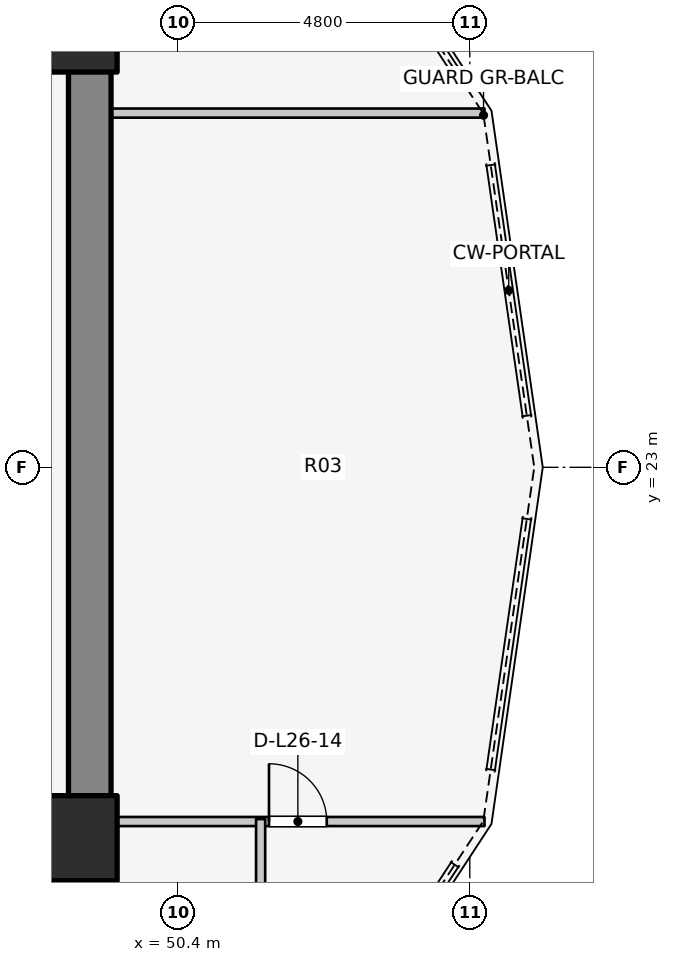
"""IFC4 building model, lengths in metres.
Left out: names, types, materials, properties, quantities, classifications, styles, units other than length and angle.
Written with IfcOpenShell. Run it as: python <this file> out.ifc"""

import sys

from ifc_helpers import new_model, si_unit, direction, frame, frame_2d, origin, origin_2d, place, context, subcontext, project, spatial, rectangle, extrude, element, fill, save


model = new_model("IFC4")
c1 = context("Model", 3, precision=1e-05, world=origin(), true_north=direction((0.0, 1.0)))
c2 = subcontext(c1, "Body", "Model", "MODEL_VIEW")
j1 = project(units=[si_unit("LENGTHUNIT", "METRE"), si_unit("PLANEANGLEUNIT", "RADIAN")], contexts=[c1])
p1 = place(None, origin())
s1 = spatial("IfcSite", under=j1, at=p1, CompositionType="ELEMENT")
p2 = place(p1, origin())
s2 = spatial("IfcBuilding", under=s1, at=p2, CompositionType="ELEMENT")
p3 = place(p2, frame((0.0, 0.0, 88.7)))
s3 = spatial("IfcBuildingStorey", under=s2, at=p3, CompositionType="ELEMENT", Elevation=88.7)
p4 = place(p3, frame((48.95, 17.05, 0.0), z_axis=(0.0, 0.0, 1.0), x_axis=(0.0, 1.0, 0.0)))
e1 = element("IfcWall", 1, at=p4, inside=s3, PredefinedType="SHEAR", context=c2, shape_type="SweptSolid", body=[
    extrude(rectangle(XDim=12.8, YDim=0.7, at=frame_2d((6.4, 0.0))), origin(), (0.0, 0.0, 1.0), 3.1),
])
for number, where, z_axis, x_axis in (
    (2, (48.7, 16.9, 0.0), (0.0, 0.0, 1.0), (1.0, 0.0, 0.0)),
    (3, (48.7, 30.2, 0.0), (0.0, 0.0, 1.0), (1.0, 0.0, 0.0)),
):
    element("IfcColumn", number, at=place(p3, frame(where, z_axis=z_axis, x_axis=x_axis)), inside=s3, PredefinedType="COLUMN", context=c2, shape_type="SweptSolid", body=[
        extrude(rectangle(XDim=1.4, YDim=1.4, at=origin_2d()), origin(), (0.0, 0.0, 1.0), 3.1),
    ])
p5 = place(p3, frame((48.95, 17.175, 0.0), z_axis=(0.0, 0.0, 1.0), x_axis=(1.0, 0.0, 0.0)))
e4 = element("IfcWall", 4, at=p5, inside=s3, PredefinedType="PARTITIONING", context=c2, shape_type="SweptSolid", body=[
    extrude(rectangle(XDim=6.492, YDim=0.15, at=frame_2d((3.246, 0.0))), origin(), (0.0, 0.0, 1.0), 2.855),
])
p6 = place(p5, frame((2.948, 0.0, 0.0)))
e5 = element("IfcOpeningElement", 5, at=p6, cuts=e4, PredefinedType="OPENING", context=c2, shape_type="SweptSolid", body=[
    extrude(rectangle(XDim=0.95, YDim=2.1, at=frame_2d((0.475, 1.05))), frame((0.0, 0.085, 0.0), z_axis=(0.0, -1.0, 0.0), x_axis=(1.0, 0.0, 0.0)), (0.0, 0.0, 1.0), 0.17),
])
p7 = place(p3, frame((48.95, 28.825, 0.0), z_axis=(0.0, 0.0, 1.0), x_axis=(1.0, 0.0, 0.0)))
e6 = element("IfcWall", 6, at=p7, inside=s3, PredefinedType="PARTITIONING", context=c2, shape_type="SweptSolid", body=[
    extrude(rectangle(XDim=6.492, YDim=0.15, at=frame_2d((3.246, 0.0))), origin(), (0.0, 0.0, 1.0), 2.855),
])
p8 = place(p3, frame((48.95, 29.8, 0.0), z_axis=(0.0, 0.0, 1.0), x_axis=(0.0, 1.0, 0.0)))
e7 = element("IfcWall", 7, at=p8, inside=s3, PredefinedType="PARTITIONING", context=c2, shape_type="SweptSolid", body=[
    extrude(rectangle(XDim=1.29, YDim=0.15, at=frame_2d((0.645, 0.0))), origin(), (0.0, 0.0, 1.0), 2.142),
])
p9 = place(p3, frame((51.76, 13.68, 0.0), z_axis=(0.0, 0.0, 1.0), x_axis=(0.0, 1.0, 0.0)))
e8 = element("IfcWall", 8, at=p9, inside=s3, PredefinedType="PARTITIONING", context=c2, shape_type="SweptSolid", body=[
    extrude(rectangle(XDim=3.535, YDim=0.15, at=frame_2d((1.768, 0.0))), origin(), (0.0, 0.0, 1.0), 2.855),
])
p10 = place(p6, origin())
e9 = element("IfcDoor", 9, at=p10, inside=s3, OperationType="SINGLE_SWING_LEFT", PredefinedType="DOOR", context=c2, shape_type="SweptSolid", body=[
    extrude(rectangle(XDim=0.95, YDim=2.1, at=frame_2d((0.475, 1.05))), frame((0.0, 0.025, 0.0), z_axis=(0.0, -1.0, 0.0), x_axis=(1.0, 0.0, 0.0)), (0.0, 0.0, 1.0), 0.05),
])
fill(e5, e9)
save(model, sys.argv[1])
